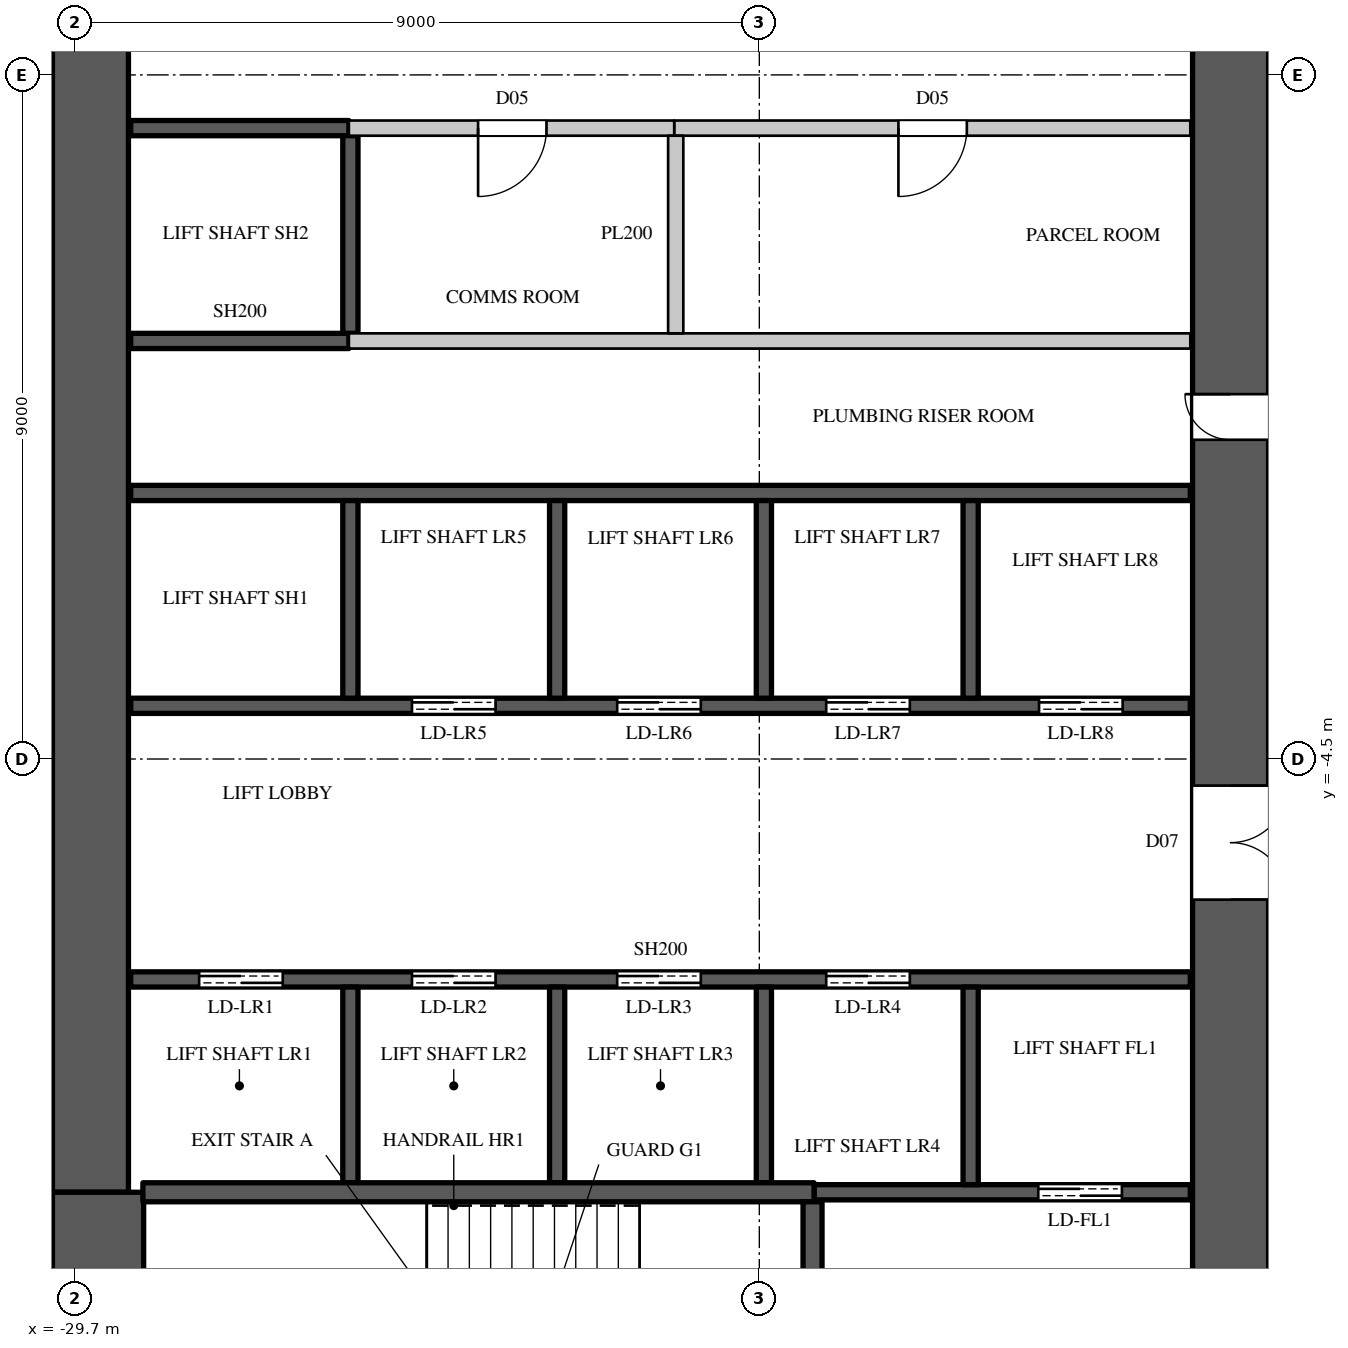
"""IFC4 building model, lengths in metres.
Left out: names, types, materials, properties, quantities, classifications, styles, units other than length and angle.
Written with IfcOpenShell. Run it as: python <this file> out.ifc"""

import sys

from ifc_helpers import new_model, si_unit, direction, frame, frame_2d, origin, place, context, subcontext, project, spatial, rectangle, extrude, element, fill, save


model = new_model("IFC4")
c1 = context("Model", 3, precision=1e-05, world=origin(), true_north=direction((0.0, 1.0)))
c2 = subcontext(c1, "Body", "Model", "MODEL_VIEW")
j1 = project(units=[si_unit("LENGTHUNIT", "METRE"), si_unit("PLANEANGLEUNIT", "RADIAN")], contexts=[c1])
p1 = place(None, origin())
s1 = spatial("IfcSite", under=j1, at=p1, CompositionType="ELEMENT")
p2 = place(p1, origin())
s2 = spatial("IfcBuilding", under=s1, at=p2, CompositionType="ELEMENT")
p3 = place(p2, frame((0.0, 0.0, 105.9)))
s3 = spatial("IfcBuildingStorey", under=s2, at=p3, CompositionType="ELEMENT", Elevation=105.9)
p4 = place(p3, frame((-14.5, -14.8, 0.0), z_axis=(0.0, 0.0, 1.0), x_axis=(0.0, 1.0, 0.0)))
e1 = element("IfcWall", 1, at=p4, inside=s3, PredefinedType="SHEAR", context=c2, shape_type="SweptSolid", body=[
    extrude(rectangle(XDim=29.6, YDim=1.0, at=frame_2d((14.8, 0.0))), origin(), (0.0, 0.0, 1.0), 3.6),
])
p5 = place(p4, frame((8.45, 0.0, 0.0)))
e2 = element("IfcOpeningElement", 2, at=p5, cuts=e1, PredefinedType="OPENING", context=c2, shape_type="SweptSolid", body=[
    extrude(rectangle(XDim=1.5, YDim=2.4, at=frame_2d((0.75, 1.2))), frame((0.0, 0.51, 0.0), z_axis=(0.0, -1.0, 0.0), x_axis=(1.0, 0.0, 0.0)), (0.0, 0.0, 1.0), 1.02),
])
p6 = place(p4, frame((19.65, 0.0, 0.0)))
e3 = element("IfcOpeningElement", 3, at=p6, cuts=e1, PredefinedType="OPENING", context=c2, shape_type="SweptSolid", body=[
    extrude(rectangle(XDim=1.5, YDim=2.4, at=frame_2d((0.75, 1.2))), frame((0.0, 0.51, 0.0), z_axis=(0.0, -1.0, 0.0), x_axis=(1.0, 0.0, 0.0)), (0.0, 0.0, 1.0), 1.02),
])
p7 = place(p4, frame((14.5, 0.0, 0.0)))
e4 = element("IfcOpeningElement", 4, at=p7, cuts=e1, PredefinedType="OPENING", context=c2, shape_type="SweptSolid", body=[
    extrude(rectangle(XDim=0.6, YDim=2.0, at=frame_2d((0.3, 1.0))), frame((0.0, 0.51, 0.0), z_axis=(0.0, -1.0, 0.0), x_axis=(1.0, 0.0, 0.0)), (0.0, 0.0, 1.0), 1.02),
])
p8 = place(p3, frame((-29.5, -10.2, 0.0), z_axis=(0.0, 0.0, 1.0), x_axis=(0.0, 1.0, 0.0)))
e5 = element("IfcWall", 5, at=p8, inside=s3, PredefinedType="SHEAR", context=c2, shape_type="SweptSolid", body=[
    extrude(rectangle(XDim=20.4, YDim=1.0, at=frame_2d((10.2, 0.0))), origin(), (0.0, 0.0, 1.0), 3.6),
])
p9 = place(p3, frame((-29.4, -14.8, 0.0), z_axis=(0.0, 0.0, 1.0), x_axis=(0.0, 1.0, 0.0)))
e6 = element("IfcWall", 6, at=p9, inside=s3, PredefinedType="SHEAR", context=c2, shape_type="SweptSolid", body=[
    extrude(rectangle(XDim=4.6, YDim=1.2, at=frame_2d((2.3, 0.0))), origin(), (0.0, 0.0, 1.0), 3.6),
])
p10 = place(p3, frame((-21.82, 3.8, 0.0), z_axis=(0.0, 0.0, 1.0), x_axis=(1.0, 0.0, 0.0)))
e7 = element("IfcWall", 7, at=p10, inside=s3, PredefinedType="PARTITIONING", context=c2, shape_type="SweptSolid", body=[
    extrude(rectangle(XDim=6.79, YDim=0.2, at=frame_2d((3.395, 0.0))), origin(), (0.0, 0.0, 1.0), 3.3),
])
p11 = place(p10, frame((2.95, 0.0, 0.0)))
e8 = element("IfcOpeningElement", 8, at=p11, cuts=e7, PredefinedType="OPENING", context=c2, shape_type="SweptSolid", body=[
    extrude(rectangle(XDim=0.9, YDim=2.2, at=frame_2d((0.45, 1.1))), frame((0.0, 0.11, 0.0), z_axis=(0.0, -1.0, 0.0), x_axis=(1.0, 0.0, 0.0)), (0.0, 0.0, 1.0), 0.22),
])
p12 = place(p3, frame((-26.1, 1.0, 0.0), z_axis=(0.0, 0.0, 1.0), x_axis=(1.0, 0.0, 0.0)))
e9 = element("IfcWall", 9, at=p12, inside=s3, PredefinedType="PARTITIONING", context=c2, shape_type="SweptSolid", body=[
    extrude(rectangle(XDim=11.07, YDim=0.2, at=frame_2d((5.535, 0.0))), origin(), (0.0, 0.0, 1.0), 3.3),
])
p13 = place(p3, frame((-26.1, 3.8, 0.0), z_axis=(0.0, 0.0, 1.0), x_axis=(1.0, 0.0, 0.0)))
e10 = element("IfcWall", 10, at=p13, inside=s3, PredefinedType="PARTITIONING", context=c2, shape_type="SweptSolid", body=[
    extrude(rectangle(XDim=4.28, YDim=0.2, at=frame_2d((2.14, 0.0))), origin(), (0.0, 0.0, 1.0), 3.3),
])
p14 = place(p13, frame((1.7, 0.0, 0.0)))
e11 = element("IfcOpeningElement", 11, at=p14, cuts=e10, PredefinedType="OPENING", context=c2, shape_type="SweptSolid", body=[
    extrude(rectangle(XDim=0.9, YDim=2.2, at=frame_2d((0.45, 1.1))), frame((0.0, 0.11, 0.0), z_axis=(0.0, -1.0, 0.0), x_axis=(1.0, 0.0, 0.0)), (0.0, 0.0, 1.0), 0.22),
])
p15 = place(p3, frame((-21.8, 1.1, 0.0), z_axis=(0.0, 0.0, 1.0), x_axis=(0.0, 1.0, 0.0)))
e12 = element("IfcWall", 12, at=p15, inside=s3, PredefinedType="PARTITIONING", context=c2, shape_type="SweptSolid", body=[
    extrude(rectangle(XDim=2.6, YDim=0.2, at=frame_2d((1.3, 0.0))), origin(), (0.0, 0.0, 1.0), 3.3),
])
p16 = place(p3, frame((-28.97, -7.4, 0.0), z_axis=(0.0, 0.0, 1.0), x_axis=(1.0, 0.0, 0.0)))
e13 = element("IfcWall", 13, at=p16, inside=s3, PredefinedType="SHEAR", context=c2, shape_type="SweptSolid", body=[
    extrude(rectangle(XDim=13.94, YDim=0.2, at=frame_2d((6.97, 0.0))), origin(), (0.0, 0.0, 1.0), 3.3),
])
p17 = place(p16, frame((0.9, 0.0, 0.0)))
e14 = element("IfcOpeningElement", 14, at=p17, cuts=e13, PredefinedType="OPENING", context=c2, shape_type="SweptSolid", body=[
    extrude(rectangle(XDim=1.1, YDim=2.2, at=frame_2d((0.55, 1.1))), frame((0.0, 0.11, 0.0), z_axis=(0.0, -1.0, 0.0), x_axis=(1.0, 0.0, 0.0)), (0.0, 0.0, 1.0), 0.22),
])
p18 = place(p16, frame((3.7, 0.0, 0.0)))
e15 = element("IfcOpeningElement", 15, at=p18, cuts=e13, PredefinedType="OPENING", context=c2, shape_type="SweptSolid", body=[
    extrude(rectangle(XDim=1.1, YDim=2.2, at=frame_2d((0.55, 1.1))), frame((0.0, 0.11, 0.0), z_axis=(0.0, -1.0, 0.0), x_axis=(1.0, 0.0, 0.0)), (0.0, 0.0, 1.0), 0.22),
])
p19 = place(p16, frame((6.4, 0.0, 0.0)))
e16 = element("IfcOpeningElement", 16, at=p19, cuts=e13, PredefinedType="OPENING", context=c2, shape_type="SweptSolid", body=[
    extrude(rectangle(XDim=1.1, YDim=2.2, at=frame_2d((0.55, 1.1))), frame((0.0, 0.11, 0.0), z_axis=(0.0, -1.0, 0.0), x_axis=(1.0, 0.0, 0.0)), (0.0, 0.0, 1.0), 0.22),
])
p20 = place(p16, frame((9.15, 0.0, 0.0)))
e17 = element("IfcOpeningElement", 17, at=p20, cuts=e13, PredefinedType="OPENING", context=c2, shape_type="SweptSolid", body=[
    extrude(rectangle(XDim=1.1, YDim=2.2, at=frame_2d((0.55, 1.1))), frame((0.0, 0.11, 0.0), z_axis=(0.0, -1.0, 0.0), x_axis=(1.0, 0.0, 0.0)), (0.0, 0.0, 1.0), 0.22),
])
p21 = place(p3, frame((-28.97, -3.8, 0.0), z_axis=(0.0, 0.0, 1.0), x_axis=(1.0, 0.0, 0.0)))
e18 = element("IfcWall", 18, at=p21, inside=s3, PredefinedType="SHEAR", context=c2, shape_type="SweptSolid", body=[
    extrude(rectangle(XDim=13.94, YDim=0.2, at=frame_2d((6.97, 0.0))), origin(), (0.0, 0.0, 1.0), 3.3),
])
p22 = place(p21, frame((3.7, 0.0, 0.0)))
e19 = element("IfcOpeningElement", 19, at=p22, cuts=e18, PredefinedType="OPENING", context=c2, shape_type="SweptSolid", body=[
    extrude(rectangle(XDim=1.1, YDim=2.2, at=frame_2d((0.55, 1.1))), frame((0.0, 0.11, 0.0), z_axis=(0.0, -1.0, 0.0), x_axis=(1.0, 0.0, 0.0)), (0.0, 0.0, 1.0), 0.22),
])
p23 = place(p21, frame((6.4, 0.0, 0.0)))
e20 = element("IfcOpeningElement", 20, at=p23, cuts=e18, PredefinedType="OPENING", context=c2, shape_type="SweptSolid", body=[
    extrude(rectangle(XDim=1.1, YDim=2.2, at=frame_2d((0.55, 1.1))), frame((0.0, 0.11, 0.0), z_axis=(0.0, -1.0, 0.0), x_axis=(1.0, 0.0, 0.0)), (0.0, 0.0, 1.0), 0.22),
])
p24 = place(p21, frame((9.15, 0.0, 0.0)))
e21 = element("IfcOpeningElement", 21, at=p24, cuts=e18, PredefinedType="OPENING", context=c2, shape_type="SweptSolid", body=[
    extrude(rectangle(XDim=1.1, YDim=2.2, at=frame_2d((0.55, 1.1))), frame((0.0, 0.11, 0.0), z_axis=(0.0, -1.0, 0.0), x_axis=(1.0, 0.0, 0.0)), (0.0, 0.0, 1.0), 0.22),
])
p25 = place(p21, frame((11.95, 0.0, 0.0)))
e22 = element("IfcOpeningElement", 22, at=p25, cuts=e18, PredefinedType="OPENING", context=c2, shape_type="SweptSolid", body=[
    extrude(rectangle(XDim=1.1, YDim=2.2, at=frame_2d((0.55, 1.1))), frame((0.0, 0.11, 0.0), z_axis=(0.0, -1.0, 0.0), x_axis=(1.0, 0.0, 0.0)), (0.0, 0.0, 1.0), 0.22),
])
p26 = place(p3, frame((-28.97, -1.0, 0.0), z_axis=(0.0, 0.0, 1.0), x_axis=(1.0, 0.0, 0.0)))
e23 = element("IfcWall", 23, at=p26, inside=s3, PredefinedType="SHEAR", context=c2, shape_type="SweptSolid", body=[
    extrude(rectangle(XDim=13.94, YDim=0.2, at=frame_2d((6.97, 0.0))), origin(), (0.0, 0.0, 1.0), 3.3),
])
for number, where, z_axis, x_axis in (
    (24, (-28.97, 1.0, 0.0), (0.0, 0.0, 1.0), (1.0, 0.0, 0.0)),
    (25, (-28.97, 3.8, 0.0), (0.0, 0.0, 1.0), (1.0, 0.0, 0.0)),
):
    element("IfcWall", number, at=place(p3, frame(where, z_axis=z_axis, x_axis=x_axis)), inside=s3, PredefinedType="SHEAR", context=c2, shape_type="SweptSolid", body=[
        extrude(rectangle(XDim=2.87, YDim=0.2, at=frame_2d((1.435, 0.0))), origin(), (0.0, 0.0, 1.0), 3.3),
    ])
p27 = place(p3, frame((-26.08, -10.075, 0.0), z_axis=(0.0, 0.0, 1.0), x_axis=(0.0, 1.0, 0.0)))
e26 = element("IfcWall", 26, at=p27, inside=s3, PredefinedType="SHEAR", context=c2, shape_type="SweptSolid", body=[
    extrude(rectangle(XDim=2.575, YDim=0.2, at=frame_2d((1.288, 0.0))), origin(), (0.0, 0.0, 1.0), 3.6),
])
p28 = place(p3, frame((-26.08, -3.7, 0.0), z_axis=(0.0, 0.0, 1.0), x_axis=(0.0, 1.0, 0.0)))
e27 = element("IfcWall", 27, at=p28, inside=s3, PredefinedType="SHEAR", context=c2, shape_type="SweptSolid", body=[
    extrude(rectangle(XDim=2.6, YDim=0.2, at=frame_2d((1.3, 0.0))), origin(), (0.0, 0.0, 1.0), 3.6),
])
p29 = place(p3, frame((-26.08, 1.1, 0.0), z_axis=(0.0, 0.0, 1.0), x_axis=(0.0, 1.0, 0.0)))
e28 = element("IfcWall", 28, at=p29, inside=s3, PredefinedType="SHEAR", context=c2, shape_type="SweptSolid", body=[
    extrude(rectangle(XDim=2.6, YDim=0.2, at=frame_2d((1.3, 0.0))), origin(), (0.0, 0.0, 1.0), 3.3),
])
p30 = place(p3, frame((-23.36, -10.075, 0.0), z_axis=(0.0, 0.0, 1.0), x_axis=(0.0, 1.0, 0.0)))
e29 = element("IfcWall", 29, at=p30, inside=s3, PredefinedType="SHEAR", context=c2, shape_type="SweptSolid", body=[
    extrude(rectangle(XDim=2.575, YDim=0.2, at=frame_2d((1.288, 0.0))), origin(), (0.0, 0.0, 1.0), 3.6),
])
p31 = place(p3, frame((-23.36, -3.7, 0.0), z_axis=(0.0, 0.0, 1.0), x_axis=(0.0, 1.0, 0.0)))
e30 = element("IfcWall", 30, at=p31, inside=s3, PredefinedType="SHEAR", context=c2, shape_type="SweptSolid", body=[
    extrude(rectangle(XDim=2.6, YDim=0.2, at=frame_2d((1.3, 0.0))), origin(), (0.0, 0.0, 1.0), 3.6),
])
p32 = place(p3, frame((-20.64, -10.075, 0.0), z_axis=(0.0, 0.0, 1.0), x_axis=(0.0, 1.0, 0.0)))
e31 = element("IfcWall", 31, at=p32, inside=s3, PredefinedType="SHEAR", context=c2, shape_type="SweptSolid", body=[
    extrude(rectangle(XDim=2.575, YDim=0.2, at=frame_2d((1.288, 0.0))), origin(), (0.0, 0.0, 1.0), 3.6),
])
p33 = place(p3, frame((-20.64, -3.7, 0.0), z_axis=(0.0, 0.0, 1.0), x_axis=(0.0, 1.0, 0.0)))
e32 = element("IfcWall", 32, at=p33, inside=s3, PredefinedType="SHEAR", context=c2, shape_type="SweptSolid", body=[
    extrude(rectangle(XDim=2.6, YDim=0.2, at=frame_2d((1.3, 0.0))), origin(), (0.0, 0.0, 1.0), 3.6),
])
p34 = place(p3, frame((-19.98, -10.2, 0.0), z_axis=(0.0, 0.0, 1.0), x_axis=(1.0, 0.0, 0.0)))
e33 = element("IfcWall", 33, at=p34, inside=s3, PredefinedType="SHEAR", context=c2, shape_type="SweptSolid", body=[
    extrude(rectangle(XDim=4.95, YDim=0.2, at=frame_2d((2.475, 0.0))), origin(), (0.0, 0.0, 1.0), 3.3),
])
p35 = place(p34, frame((2.95, 0.0, 0.0)))
e34 = element("IfcOpeningElement", 34, at=p35, cuts=e33, PredefinedType="OPENING", context=c2, shape_type="SweptSolid", body=[
    extrude(rectangle(XDim=1.1, YDim=2.2, at=frame_2d((0.55, 1.1))), frame((0.0, 0.11, 0.0), z_axis=(0.0, -1.0, 0.0), x_axis=(1.0, 0.0, 0.0)), (0.0, 0.0, 1.0), 0.22),
])
p36 = place(p3, frame((-17.92, -10.1, 0.0), z_axis=(0.0, 0.0, 1.0), x_axis=(0.0, 1.0, 0.0)))
e35 = element("IfcWall", 35, at=p36, inside=s3, PredefinedType="SHEAR", context=c2, shape_type="SweptSolid", body=[
    extrude(rectangle(XDim=2.6, YDim=0.2, at=frame_2d((1.3, 0.0))), origin(), (0.0, 0.0, 1.0), 3.6),
])
p37 = place(p3, frame((-17.92, -3.7, 0.0), z_axis=(0.0, 0.0, 1.0), x_axis=(0.0, 1.0, 0.0)))
e36 = element("IfcWall", 36, at=p37, inside=s3, PredefinedType="SHEAR", context=c2, shape_type="SweptSolid", body=[
    extrude(rectangle(XDim=2.6, YDim=0.2, at=frame_2d((1.3, 0.0))), origin(), (0.0, 0.0, 1.0), 3.6),
])
p38 = place(p3, frame((-28.81, -10.2, 0.0), z_axis=(0.0, 0.0, 1.0), x_axis=(1.0, 0.0, 0.0)))
e37 = element("IfcWall", 37, at=p38, inside=s3, PredefinedType="SHEAR", context=c2, shape_type="SweptSolid", body=[
    extrude(rectangle(XDim=8.83, YDim=0.25, at=frame_2d((4.415, 0.0))), origin(), (0.0, 0.0, 1.0), 3.3),
])
p39 = place(p3, frame((-20.0, -14.77, 0.0), z_axis=(0.0, 0.0, 1.0), x_axis=(0.0, 1.0, 0.0)))
e38 = element("IfcWall", 38, at=p39, inside=s3, PredefinedType="SHEAR", context=c2, shape_type="SweptSolid", body=[
    extrude(rectangle(XDim=4.445, YDim=0.25, at=frame_2d((2.223, 0.0))), origin(), (0.0, 0.0, 1.0), 3.3),
])
p40 = place(p39, frame((1.7, 0.0, 0.0)))
e39 = element("IfcOpeningElement", 39, at=p40, cuts=e38, PredefinedType="OPENING", context=c2, shape_type="SweptSolid", body=[
    extrude(rectangle(XDim=1.1, YDim=2.2, at=frame_2d((0.55, 1.1))), frame((0.0, 0.135, 0.0), z_axis=(0.0, -1.0, 0.0), x_axis=(1.0, 0.0, 0.0)), (0.0, 0.0, 1.0), 0.27),
])
p41 = place(p14, origin())
e40 = element("IfcDoor", 40, at=p41, inside=s3, OperationType="SINGLE_SWING_RIGHT", PredefinedType="DOOR", context=c2, shape_type="SweptSolid", body=[
    extrude(rectangle(XDim=0.9, YDim=2.2, at=frame_2d((0.45, 1.1))), frame((0.0, 0.025, 0.0), z_axis=(0.0, -1.0, 0.0), x_axis=(1.0, 0.0, 0.0)), (0.0, 0.0, 1.0), 0.05),
])
fill(e11, e40)
p42 = place(p11, origin())
e41 = element("IfcDoor", 41, at=p42, inside=s3, OperationType="SINGLE_SWING_RIGHT", PredefinedType="DOOR", context=c2, shape_type="SweptSolid", body=[
    extrude(rectangle(XDim=0.9, YDim=2.2, at=frame_2d((0.45, 1.1))), frame((0.0, 0.025, 0.0), z_axis=(0.0, -1.0, 0.0), x_axis=(1.0, 0.0, 0.0)), (0.0, 0.0, 1.0), 0.05),
])
fill(e8, e41)
p43 = place(p17, origin())
e42 = element("IfcDoor", 42, at=p43, inside=s3, OperationType="DOUBLE_DOOR_SLIDING", PredefinedType="DOOR", context=c2, shape_type="SweptSolid", body=[
    extrude(rectangle(XDim=1.1, YDim=2.2, at=frame_2d((0.55, 1.1))), frame((0.0, 0.025, 0.0), z_axis=(0.0, -1.0, 0.0), x_axis=(1.0, 0.0, 0.0)), (0.0, 0.0, 1.0), 0.05),
])
fill(e14, e42)
p44 = place(p18, origin())
e43 = element("IfcDoor", 43, at=p44, inside=s3, OperationType="DOUBLE_DOOR_SLIDING", PredefinedType="DOOR", context=c2, shape_type="SweptSolid", body=[
    extrude(rectangle(XDim=1.1, YDim=2.2, at=frame_2d((0.55, 1.1))), frame((0.0, 0.025, 0.0), z_axis=(0.0, -1.0, 0.0), x_axis=(1.0, 0.0, 0.0)), (0.0, 0.0, 1.0), 0.05),
])
fill(e15, e43)
p45 = place(p19, origin())
e44 = element("IfcDoor", 44, at=p45, inside=s3, OperationType="DOUBLE_DOOR_SLIDING", PredefinedType="DOOR", context=c2, shape_type="SweptSolid", body=[
    extrude(rectangle(XDim=1.1, YDim=2.2, at=frame_2d((0.55, 1.1))), frame((0.0, 0.025, 0.0), z_axis=(0.0, -1.0, 0.0), x_axis=(1.0, 0.0, 0.0)), (0.0, 0.0, 1.0), 0.05),
])
fill(e16, e44)
p46 = place(p20, origin())
e45 = element("IfcDoor", 45, at=p46, inside=s3, OperationType="DOUBLE_DOOR_SLIDING", PredefinedType="DOOR", context=c2, shape_type="SweptSolid", body=[
    extrude(rectangle(XDim=1.1, YDim=2.2, at=frame_2d((0.55, 1.1))), frame((0.0, 0.025, 0.0), z_axis=(0.0, -1.0, 0.0), x_axis=(1.0, 0.0, 0.0)), (0.0, 0.0, 1.0), 0.05),
])
fill(e17, e45)
p47 = place(p35, origin())
e46 = element("IfcDoor", 46, at=p47, inside=s3, OperationType="DOUBLE_DOOR_SLIDING", PredefinedType="DOOR", context=c2, shape_type="SweptSolid", body=[
    extrude(rectangle(XDim=1.1, YDim=2.2, at=frame_2d((0.55, 1.1))), frame((0.0, 0.025, 0.0), z_axis=(0.0, -1.0, 0.0), x_axis=(1.0, 0.0, 0.0)), (0.0, 0.0, 1.0), 0.05),
])
fill(e34, e46)
p48 = place(p22, origin())
e47 = element("IfcDoor", 47, at=p48, inside=s3, OperationType="DOUBLE_DOOR_SLIDING", PredefinedType="DOOR", context=c2, shape_type="SweptSolid", body=[
    extrude(rectangle(XDim=1.1, YDim=2.2, at=frame_2d((0.55, 1.1))), frame((0.0, 0.025, 0.0), z_axis=(0.0, -1.0, 0.0), x_axis=(1.0, 0.0, 0.0)), (0.0, 0.0, 1.0), 0.05),
])
fill(e19, e47)
p49 = place(p23, origin())
e48 = element("IfcDoor", 48, at=p49, inside=s3, OperationType="DOUBLE_DOOR_SLIDING", PredefinedType="DOOR", context=c2, shape_type="SweptSolid", body=[
    extrude(rectangle(XDim=1.1, YDim=2.2, at=frame_2d((0.55, 1.1))), frame((0.0, 0.025, 0.0), z_axis=(0.0, -1.0, 0.0), x_axis=(1.0, 0.0, 0.0)), (0.0, 0.0, 1.0), 0.05),
])
fill(e20, e48)
p50 = place(p24, origin())
e49 = element("IfcDoor", 49, at=p50, inside=s3, OperationType="DOUBLE_DOOR_SLIDING", PredefinedType="DOOR", context=c2, shape_type="SweptSolid", body=[
    extrude(rectangle(XDim=1.1, YDim=2.2, at=frame_2d((0.55, 1.1))), frame((0.0, 0.025, 0.0), z_axis=(0.0, -1.0, 0.0), x_axis=(1.0, 0.0, 0.0)), (0.0, 0.0, 1.0), 0.05),
])
fill(e21, e49)
p51 = place(p25, origin())
e50 = element("IfcDoor", 50, at=p51, inside=s3, OperationType="DOUBLE_DOOR_SLIDING", PredefinedType="DOOR", context=c2, shape_type="SweptSolid", body=[
    extrude(rectangle(XDim=1.1, YDim=2.2, at=frame_2d((0.55, 1.1))), frame((0.0, 0.025, 0.0), z_axis=(0.0, -1.0, 0.0), x_axis=(1.0, 0.0, 0.0)), (0.0, 0.0, 1.0), 0.05),
])
fill(e22, e50)
p52 = place(p5, origin())
e51 = element("IfcDoor", 51, at=p52, inside=s3, OperationType="DOUBLE_DOOR_SINGLE_SWING", PredefinedType="DOOR", context=c2, shape_type="SweptSolid", body=[
    extrude(rectangle(XDim=1.5, YDim=2.4, at=frame_2d((0.75, 1.2))), frame((0.0, -0.445, 0.0), z_axis=(0.0, -1.0, 0.0), x_axis=(1.0, 0.0, 0.0)), (0.0, 0.0, 1.0), 0.05),
])
fill(e2, e51)
p53 = place(p7, origin())
e52 = element("IfcDoor", 52, at=p53, inside=s3, OperationType="SINGLE_SWING_RIGHT", PredefinedType="DOOR", context=c2, shape_type="SweptSolid", body=[
    extrude(rectangle(XDim=0.6, YDim=2.0, at=frame_2d((0.3, 1.0))), frame((0.0, 0.495, 0.0), z_axis=(0.0, -1.0, 0.0), x_axis=(1.0, 0.0, 0.0)), (0.0, 0.0, 1.0), 0.05),
])
fill(e4, e52)
save(model, sys.argv[1])
